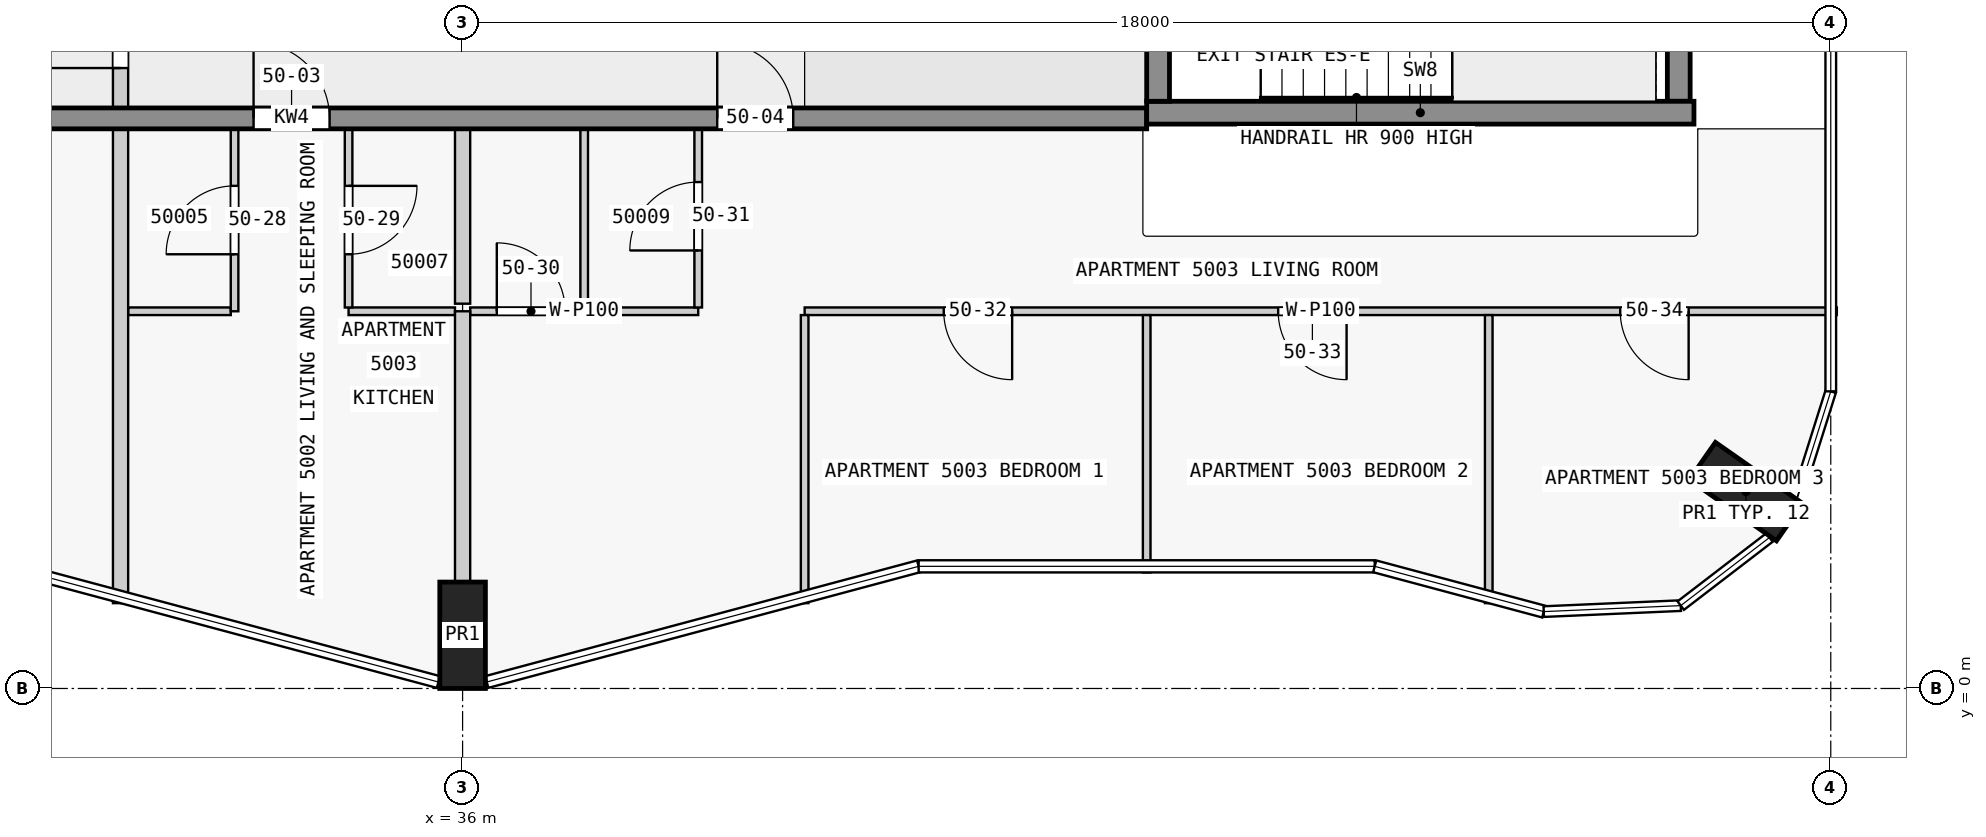
"""IFC4 building model, lengths in metres.
Left out: names, types, materials, properties, quantities, classifications, styles, units other than length and angle.
Written with IfcOpenShell. Run it as: python <this file> out.ifc"""

import sys

from ifc_helpers import new_model, si_unit, direction, frame, frame_2d, origin, origin_2d, place, context, subcontext, project, spatial, rectangle, extrude, element, fill, save


model = new_model("IFC4")
c1 = context("Model", 3, precision=1e-05, world=origin(), true_north=direction((0.0, 1.0)))
c2 = subcontext(c1, "Body", "Model", "MODEL_VIEW")
j1 = project(units=[si_unit("LENGTHUNIT", "METRE"), si_unit("PLANEANGLEUNIT", "RADIAN")], contexts=[c1])
p1 = place(None, origin())
s1 = spatial("IfcSite", under=j1, at=p1, CompositionType="ELEMENT")
p2 = place(p1, origin())
s2 = spatial("IfcBuilding", under=s1, at=p2, CompositionType="ELEMENT")
p3 = place(p2, frame((0.0, 0.0, 194.4)))
s3 = spatial("IfcBuildingStorey", under=s2, at=p3, CompositionType="ELEMENT", Elevation=194.4)
for number, where, z_axis, x_axis in (
    (1, (36.0, 0.7, 0.0), (0.0, 0.0, 1.0), (1.0, 0.0, 0.0)),
    (2, (52.884, 2.59, 0.0), (0.0, 0.0, 1.0), (0.574, 0.819, 0.0)),
):
    element("IfcColumn", number, at=place(p3, frame(where, z_axis=z_axis, x_axis=x_axis)), inside=s3, PredefinedType="COLUMN", context=c2, shape_type="SweptSolid", body=[
        extrude(rectangle(XDim=0.6, YDim=1.4, at=origin_2d()), origin(), (0.0, 0.0, 1.0), 3.5),
    ])
p4 = place(p3, frame((45.15, 7.725, 0.0), z_axis=(0.0, 0.0, 1.0), x_axis=(0.0, 1.0, 0.0)))
e3 = element("IfcWall", 3, at=p4, inside=s3, PredefinedType="SHEAR", context=c2, shape_type="SweptSolid", body=[
    extrude(rectangle(XDim=2.55, YDim=0.3, at=frame_2d((1.275, 0.0))), origin(), (0.0, 0.0, 1.0), 3.5),
])
p5 = place(p4, frame((0.725, 0.0, 0.0)))
e4 = element("IfcOpeningElement", 4, at=p5, cuts=e3, PredefinedType="OPENING", context=c2, shape_type="SweptSolid", body=[
    extrude(rectangle(XDim=1.1, YDim=2.1, at=frame_2d((0.55, 1.05))), frame((0.0, 0.16, 0.0), z_axis=(0.0, -1.0, 0.0), x_axis=(1.0, 0.0, 0.0)), (0.0, 0.0, 1.0), 0.32),
])
p6 = place(p3, frame((52.0, 7.725, 0.0), z_axis=(0.0, 0.0, 1.0), x_axis=(0.0, 1.0, 0.0)))
e5 = element("IfcWall", 5, at=p6, inside=s3, PredefinedType="SHEAR", context=c2, shape_type="SweptSolid", body=[
    extrude(rectangle(XDim=2.55, YDim=0.3, at=frame_2d((1.275, 0.0))), origin(), (0.0, 0.0, 1.0), 3.5),
])
p7 = place(p3, frame((45.0, 7.575, 0.0), z_axis=(0.0, 0.0, 1.0), x_axis=(1.0, 0.0, 0.0)))
e6 = element("IfcWall", 6, at=p7, inside=s3, PredefinedType="SHEAR", context=c2, shape_type="SweptSolid", body=[
    extrude(rectangle(XDim=7.2, YDim=0.3, at=frame_2d((3.6, 0.0))), origin(), (0.0, 0.0, 1.0), 3.5),
])
p8 = place(p3, frame((22.5, 7.5, 0.0), z_axis=(0.0, 0.0, 1.0), x_axis=(1.0, 0.0, 0.0)))
e7 = element("IfcWall", 7, at=p8, inside=s3, PredefinedType="SHEAR", context=c2, shape_type="SweptSolid", body=[
    extrude(rectangle(XDim=22.5, YDim=0.275, at=frame_2d((11.25, 0.0))), origin(), (0.0, 0.0, 1.0), 3.25),
])
p9 = place(p8, frame((1.75, 0.0, 0.0)))
e8 = element("IfcOpeningElement", 8, at=p9, cuts=e7, PredefinedType="OPENING", context=c2, shape_type="SweptSolid", body=[
    extrude(rectangle(XDim=1.0, YDim=2.1, at=frame_2d((0.5, 1.05))), frame((0.0, 0.147, 0.0), z_axis=(0.0, -1.0, 0.0), x_axis=(1.0, 0.0, 0.0)), (0.0, 0.0, 1.0), 0.295),
])
p10 = place(p8, frame((5.85, 0.0, 0.0)))
e9 = element("IfcOpeningElement", 9, at=p10, cuts=e7, PredefinedType="OPENING", context=c2, shape_type="SweptSolid", body=[
    extrude(rectangle(XDim=1.8, YDim=2.1, at=frame_2d((0.9, 1.05))), frame((0.0, 0.147, 0.0), z_axis=(0.0, -1.0, 0.0), x_axis=(1.0, 0.0, 0.0)), (0.0, 0.0, 1.0), 0.295),
])
p11 = place(p8, frame((10.75, 0.0, 0.0)))
e10 = element("IfcOpeningElement", 10, at=p11, cuts=e7, PredefinedType="OPENING", context=c2, shape_type="SweptSolid", body=[
    extrude(rectangle(XDim=1.0, YDim=2.1, at=frame_2d((0.5, 1.05))), frame((0.0, 0.147, 0.0), z_axis=(0.0, -1.0, 0.0), x_axis=(1.0, 0.0, 0.0)), (0.0, 0.0, 1.0), 0.295),
])
p12 = place(p8, frame((16.85, 0.0, 0.0)))
e11 = element("IfcOpeningElement", 11, at=p12, cuts=e7, PredefinedType="OPENING", context=c2, shape_type="SweptSolid", body=[
    extrude(rectangle(XDim=1.0, YDim=2.1, at=frame_2d((0.5, 1.05))), frame((0.0, 0.147, 0.0), z_axis=(0.0, -1.0, 0.0), x_axis=(1.0, 0.0, 0.0)), (0.0, 0.0, 1.0), 0.295),
])
p13 = place(p3, frame((54.08, 4.962, 0.0), z_axis=(0.0, 0.0, 1.0), x_axis=(-1.0, 0.0, 0.0)))
e12 = element("IfcWall", 12, at=p13, inside=s3, PredefinedType="PARTITIONING", context=c2, shape_type="SweptSolid", body=[
    extrude(rectangle(XDim=13.58, YDim=0.1, at=frame_2d((6.79, 0.0))), origin(), (0.0, 0.0, 1.0), 3.25),
])
p14 = place(p13, frame((10.85, 0.0, 0.0)))
e13 = element("IfcOpeningElement", 13, at=p14, cuts=e12, PredefinedType="OPENING", context=c2, shape_type="SweptSolid", body=[
    extrude(rectangle(XDim=0.9, YDim=2.1, at=frame_2d((0.45, 1.05))), frame((0.0, 0.06, 0.0), z_axis=(0.0, -1.0, 0.0), x_axis=(1.0, 0.0, 0.0)), (0.0, 0.0, 1.0), 0.12),
])
p15 = place(p13, frame((6.45, 0.0, 0.0)))
e14 = element("IfcOpeningElement", 14, at=p15, cuts=e12, PredefinedType="OPENING", context=c2, shape_type="SweptSolid", body=[
    extrude(rectangle(XDim=0.9, YDim=2.1, at=frame_2d((0.45, 1.05))), frame((0.0, 0.06, 0.0), z_axis=(0.0, -1.0, 0.0), x_axis=(1.0, 0.0, 0.0)), (0.0, 0.0, 1.0), 0.12),
])
p16 = place(p13, frame((1.95, 0.0, 0.0)))
e15 = element("IfcOpeningElement", 15, at=p16, cuts=e12, PredefinedType="OPENING", context=c2, shape_type="SweptSolid", body=[
    extrude(rectangle(XDim=0.9, YDim=2.1, at=frame_2d((0.45, 1.05))), frame((0.0, 0.06, 0.0), z_axis=(0.0, -1.0, 0.0), x_axis=(1.0, 0.0, 0.0)), (0.0, 0.0, 1.0), 0.12),
])
p17 = place(p3, frame((31.6, 4.962, 0.0), z_axis=(0.0, 0.0, 1.0), x_axis=(1.0, 0.0, 0.0)))
e16 = element("IfcWall", 16, at=p17, inside=s3, PredefinedType="PARTITIONING", context=c2, shape_type="SweptSolid", body=[
    extrude(rectangle(XDim=1.35, YDim=0.1, at=frame_2d((0.675, 0.0))), origin(), (0.0, 0.0, 1.0), 3.25),
])
p18 = place(p3, frame((34.5, 4.962, 0.0), z_axis=(0.0, 0.0, 1.0), x_axis=(1.0, 0.0, 0.0)))
e17 = element("IfcWall", 17, at=p18, inside=s3, PredefinedType="PARTITIONING", context=c2, shape_type="SweptSolid", body=[
    extrude(rectangle(XDim=1.4, YDim=0.1, at=frame_2d((0.7, 0.0))), origin(), (0.0, 0.0, 1.0), 3.25),
])
p19 = place(p3, frame((36.1, 4.962, 0.0), z_axis=(0.0, 0.0, 1.0), x_axis=(1.0, 0.0, 0.0)))
e18 = element("IfcWall", 18, at=p19, inside=s3, PredefinedType="PARTITIONING", context=c2, shape_type="SweptSolid", body=[
    extrude(rectangle(XDim=3.0, YDim=0.1, at=frame_2d((1.5, 0.0))), origin(), (0.0, 0.0, 1.0), 3.25),
])
p20 = place(p19, frame((0.35, 0.0, 0.0)))
e19 = element("IfcOpeningElement", 19, at=p20, cuts=e18, PredefinedType="OPENING", context=c2, shape_type="SweptSolid", body=[
    extrude(rectangle(XDim=0.9, YDim=2.1, at=frame_2d((0.45, 1.05))), frame((0.0, 0.06, 0.0), z_axis=(0.0, -1.0, 0.0), x_axis=(1.0, 0.0, 0.0)), (0.0, 0.0, 1.0), 0.12),
])
p21 = place(p3, frame((31.5, 1.122, 0.0), z_axis=(0.0, 0.0, 1.0), x_axis=(0.0, 1.0, 0.0)))
e20 = element("IfcWall", 20, at=p21, inside=s3, PredefinedType="PARTITIONING", context=c2, shape_type="SweptSolid", body=[
    extrude(rectangle(XDim=6.24, YDim=0.2, at=frame_2d((3.12, 0.0))), origin(), (0.0, 0.0, 1.0), 3.25),
])
p22 = place(p3, frame((33.0, 4.962, 0.0), z_axis=(0.0, 0.0, 1.0), x_axis=(0.0, 1.0, 0.0)))
e21 = element("IfcWall", 21, at=p22, inside=s3, PredefinedType="PARTITIONING", context=c2, shape_type="SweptSolid", body=[
    extrude(rectangle(XDim=2.4, YDim=0.1, at=frame_2d((1.2, 0.0))), origin(), (0.0, 0.0, 1.0), 3.25),
])
p23 = place(p22, frame((0.75, 0.0, 0.0)))
e22 = element("IfcOpeningElement", 22, at=p23, cuts=e21, PredefinedType="OPENING", context=c2, shape_type="SweptSolid", body=[
    extrude(rectangle(XDim=0.9, YDim=2.1, at=frame_2d((0.45, 1.05))), frame((0.0, 0.06, 0.0), z_axis=(0.0, -1.0, 0.0), x_axis=(1.0, 0.0, 0.0)), (0.0, 0.0, 1.0), 0.12),
])
p24 = place(p3, frame((34.5, 7.363, 0.0), z_axis=(0.0, 0.0, 1.0), x_axis=(0.0, -1.0, 0.0)))
e23 = element("IfcWall", 23, at=p24, inside=s3, PredefinedType="PARTITIONING", context=c2, shape_type="SweptSolid", body=[
    extrude(rectangle(XDim=2.35, YDim=0.1, at=frame_2d((1.175, 0.0))), origin(), (0.0, 0.0, 1.0), 3.25),
])
p25 = place(p24, frame((0.75, 0.0, 0.0)))
e24 = element("IfcOpeningElement", 24, at=p25, cuts=e23, PredefinedType="OPENING", context=c2, shape_type="SweptSolid", body=[
    extrude(rectangle(XDim=0.9, YDim=2.1, at=frame_2d((0.45, 1.05))), frame((0.0, 0.06, 0.0), z_axis=(0.0, -1.0, 0.0), x_axis=(1.0, 0.0, 0.0)), (0.0, 0.0, 1.0), 0.12),
])
p26 = place(p3, frame((36.0, 4.962, 0.0), z_axis=(0.0, 0.0, 1.0), x_axis=(0.0, -1.0, 0.0)))
e25 = element("IfcWall", 25, at=p26, inside=s3, PredefinedType="PARTITIONING", context=c2, shape_type="SweptSolid", body=[
    extrude(rectangle(XDim=3.562, YDim=0.2, at=frame_2d((1.781, 0.0))), origin(), (0.0, 0.0, 1.0), 3.25),
])
p27 = place(p3, frame((36.0, 5.062, 0.0), z_axis=(0.0, 0.0, 1.0), x_axis=(0.0, 1.0, 0.0)))
e26 = element("IfcWall", 26, at=p27, inside=s3, PredefinedType="PARTITIONING", context=c2, shape_type="SweptSolid", body=[
    extrude(rectangle(XDim=2.3, YDim=0.2, at=frame_2d((1.15, 0.0))), origin(), (0.0, 0.0, 1.0), 3.25),
])
p28 = place(p3, frame((37.6, 5.012, 0.0), z_axis=(0.0, 0.0, 1.0), x_axis=(0.0, 1.0, 0.0)))
e27 = element("IfcWall", 27, at=p28, inside=s3, PredefinedType="PARTITIONING", context=c2, shape_type="SweptSolid", body=[
    extrude(rectangle(XDim=2.35, YDim=0.1, at=frame_2d((1.175, 0.0))), origin(), (0.0, 0.0, 1.0), 3.25),
])
p29 = place(p3, frame((39.1, 5.012, 0.0), z_axis=(0.0, 0.0, 1.0), x_axis=(0.0, 1.0, 0.0)))
e28 = element("IfcWall", 28, at=p29, inside=s3, PredefinedType="PARTITIONING", context=c2, shape_type="SweptSolid", body=[
    extrude(rectangle(XDim=2.35, YDim=0.1, at=frame_2d((1.175, 0.0))), origin(), (0.0, 0.0, 1.0), 3.25),
])
p30 = place(p29, frame((0.75, 0.0, 0.0)))
e29 = element("IfcOpeningElement", 29, at=p30, cuts=e28, PredefinedType="OPENING", context=c2, shape_type="SweptSolid", body=[
    extrude(rectangle(XDim=0.9, YDim=2.1, at=frame_2d((0.45, 1.05))), frame((0.0, 0.06, 0.0), z_axis=(0.0, -1.0, 0.0), x_axis=(1.0, 0.0, 0.0)), (0.0, 0.0, 1.0), 0.12),
])
p31 = place(p3, frame((40.5, 4.913, 0.0), z_axis=(0.0, 0.0, 1.0), x_axis=(0.0, -1.0, 0.0)))
e30 = element("IfcWall", 30, at=p31, inside=s3, PredefinedType="PARTITIONING", context=c2, shape_type="SweptSolid", body=[
    extrude(rectangle(XDim=3.79, YDim=0.1, at=frame_2d((1.895, 0.0))), origin(), (0.0, 0.0, 1.0), 3.25),
])
p32 = place(p3, frame((45.0, 1.527, 0.0), z_axis=(0.0, 0.0, 1.0), x_axis=(0.0, 1.0, 0.0)))
e31 = element("IfcWall", 31, at=p32, inside=s3, PredefinedType="PARTITIONING", context=c2, shape_type="SweptSolid", body=[
    extrude(rectangle(XDim=3.386, YDim=0.1, at=frame_2d((1.693, 0.0))), origin(), (0.0, 0.0, 1.0), 3.25),
])
p33 = place(p3, frame((49.5, 1.122, 0.0), z_axis=(0.0, 0.0, 1.0), x_axis=(0.0, 1.0, 0.0)))
e32 = element("IfcWall", 32, at=p33, inside=s3, PredefinedType="PARTITIONING", context=c2, shape_type="SweptSolid", body=[
    extrude(rectangle(XDim=3.79, YDim=0.1, at=frame_2d((1.895, 0.0))), origin(), (0.0, 0.0, 1.0), 3.25),
])
p34 = place(p3, frame((31.5, 7.462, 0.0), z_axis=(0.0, 0.0, 1.0), x_axis=(0.0, 1.0, 0.0)))
e33 = element("IfcWall", 33, at=p34, inside=s3, PredefinedType="PARTITIONING", context=c2, shape_type="SweptSolid", body=[
    extrude(rectangle(XDim=3.175, YDim=0.2, at=frame_2d((1.587, 0.0))), origin(), (0.0, 0.0, 1.0), 3.25),
])
p35 = place(p34, frame((0.7, 0.0, 0.0)))
e34 = element("IfcOpeningElement", 34, at=p35, cuts=e33, PredefinedType="OPENING", context=c2, shape_type="SweptSolid", body=[
    extrude(rectangle(XDim=1.8, YDim=2.1, at=frame_2d((0.9, 1.05))), frame((0.0, 0.11, 0.0), z_axis=(0.0, -1.0, 0.0), x_axis=(1.0, 0.0, 0.0)), (0.0, 0.0, 1.0), 0.22),
])
p36 = place(p11, origin())
e35 = element("IfcDoor", 35, at=p36, inside=s3, OperationType="SINGLE_SWING_LEFT", PredefinedType="DOOR", context=c2, shape_type="SweptSolid", body=[
    extrude(rectangle(XDim=1.0, YDim=2.1, at=frame_2d((0.5, 1.05))), frame((0.0, 0.025, 0.0), z_axis=(0.0, -1.0, 0.0), x_axis=(1.0, 0.0, 0.0)), (0.0, 0.0, 1.0), 0.05),
])
fill(e10, e35)
p37 = place(p12, origin())
e36 = element("IfcDoor", 36, at=p37, inside=s3, OperationType="SINGLE_SWING_RIGHT", PredefinedType="DOOR", context=c2, shape_type="SweptSolid", body=[
    extrude(rectangle(XDim=1.0, YDim=2.1, at=frame_2d((0.5, 1.05))), frame((0.0, 0.025, 0.0), z_axis=(0.0, -1.0, 0.0), x_axis=(1.0, 0.0, 0.0)), (0.0, 0.0, 1.0), 0.05),
])
fill(e11, e36)
p38 = place(p35, origin())
e37 = element("IfcDoor", 37, at=p38, inside=s3, OperationType="SINGLE_SWING_RIGHT", PredefinedType="DOOR", context=c2, shape_type="SweptSolid", body=[
    extrude(rectangle(XDim=1.8, YDim=2.1, at=frame_2d((0.9, 1.05))), frame((0.0, 0.025, 0.0), z_axis=(0.0, -1.0, 0.0), x_axis=(1.0, 0.0, 0.0)), (0.0, 0.0, 1.0), 0.05),
])
fill(e34, e37)
p39 = place(p23, origin())
e38 = element("IfcDoor", 38, at=p39, inside=s3, OperationType="SINGLE_SWING_RIGHT", PredefinedType="DOOR", context=c2, shape_type="SweptSolid", body=[
    extrude(rectangle(XDim=0.9, YDim=2.1, at=frame_2d((0.45, 1.05))), frame((0.0, 0.025, 0.0), z_axis=(0.0, -1.0, 0.0), x_axis=(1.0, 0.0, 0.0)), (0.0, 0.0, 1.0), 0.05),
])
fill(e22, e38)
p40 = place(p25, origin())
e39 = element("IfcDoor", 39, at=p40, inside=s3, OperationType="SINGLE_SWING_RIGHT", PredefinedType="DOOR", context=c2, shape_type="SweptSolid", body=[
    extrude(rectangle(XDim=0.9, YDim=2.1, at=frame_2d((0.45, 1.05))), frame((0.0, 0.025, 0.0), z_axis=(0.0, -1.0, 0.0), x_axis=(1.0, 0.0, 0.0)), (0.0, 0.0, 1.0), 0.05),
])
fill(e24, e39)
p41 = place(p20, origin())
e40 = element("IfcDoor", 40, at=p41, inside=s3, OperationType="SINGLE_SWING_LEFT", PredefinedType="DOOR", context=c2, shape_type="SweptSolid", body=[
    extrude(rectangle(XDim=0.9, YDim=2.1, at=frame_2d((0.45, 1.05))), frame((0.0, 0.025, 0.0), z_axis=(0.0, -1.0, 0.0), x_axis=(1.0, 0.0, 0.0)), (0.0, 0.0, 1.0), 0.05),
])
fill(e19, e40)
p42 = place(p30, origin())
e41 = element("IfcDoor", 41, at=p42, inside=s3, OperationType="SINGLE_SWING_RIGHT", PredefinedType="DOOR", context=c2, shape_type="SweptSolid", body=[
    extrude(rectangle(XDim=0.9, YDim=2.1, at=frame_2d((0.45, 1.05))), frame((0.0, 0.025, 0.0), z_axis=(0.0, -1.0, 0.0), x_axis=(1.0, 0.0, 0.0)), (0.0, 0.0, 1.0), 0.05),
])
fill(e29, e41)
p43 = place(p14, origin())
e42 = element("IfcDoor", 42, at=p43, inside=s3, OperationType="SINGLE_SWING_RIGHT", PredefinedType="DOOR", context=c2, shape_type="SweptSolid", body=[
    extrude(rectangle(XDim=0.9, YDim=2.1, at=frame_2d((0.45, 1.05))), frame((0.0, 0.025, 0.0), z_axis=(0.0, -1.0, 0.0), x_axis=(1.0, 0.0, 0.0)), (0.0, 0.0, 1.0), 0.05),
])
fill(e13, e42)
p44 = place(p15, origin())
e43 = element("IfcDoor", 43, at=p44, inside=s3, OperationType="SINGLE_SWING_RIGHT", PredefinedType="DOOR", context=c2, shape_type="SweptSolid", body=[
    extrude(rectangle(XDim=0.9, YDim=2.1, at=frame_2d((0.45, 1.05))), frame((0.0, 0.025, 0.0), z_axis=(0.0, -1.0, 0.0), x_axis=(1.0, 0.0, 0.0)), (0.0, 0.0, 1.0), 0.05),
])
fill(e14, e43)
p45 = place(p16, origin())
e44 = element("IfcDoor", 44, at=p45, inside=s3, OperationType="SINGLE_SWING_LEFT", PredefinedType="DOOR", context=c2, shape_type="SweptSolid", body=[
    extrude(rectangle(XDim=0.9, YDim=2.1, at=frame_2d((0.45, 1.05))), frame((0.0, 0.025, 0.0), z_axis=(0.0, -1.0, 0.0), x_axis=(1.0, 0.0, 0.0)), (0.0, 0.0, 1.0), 0.05),
])
fill(e15, e44)
save(model, sys.argv[1])
